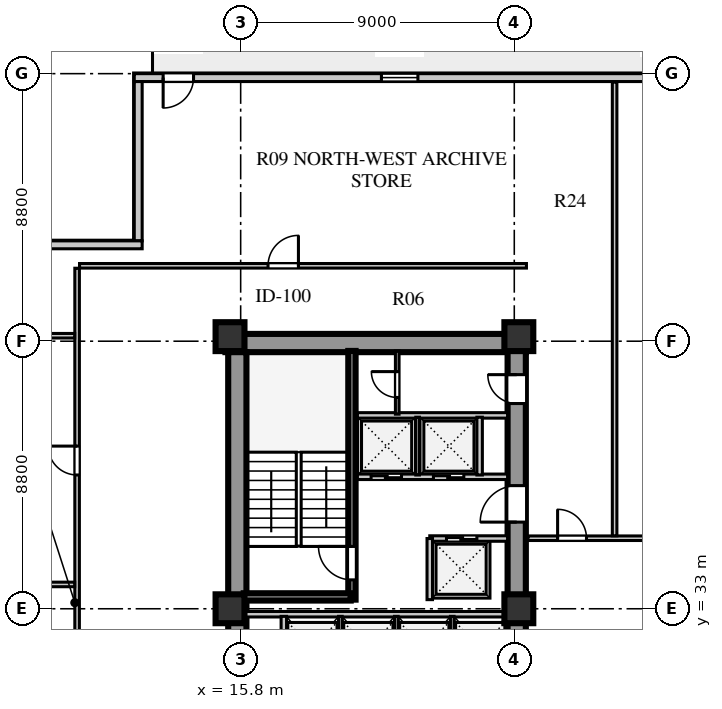
"""IFC4 building model, lengths in metres.
Left out: names, types, materials, properties, quantities, classifications, styles, units other than length and angle.
Written with IfcOpenShell. Run it as: python <this file> out.ifc"""

import sys

from ifc_helpers import new_model, si_unit, direction, frame, frame_2d, origin, origin_2d, place, context, subcontext, project, spatial, rectangle, extrude, element, fill, save


model = new_model("IFC4")
c1 = context("Model", 3, precision=1e-05, world=origin(), true_north=direction((0.0, 1.0)))
c2 = subcontext(c1, "Body", "Model", "MODEL_VIEW")
j1 = project(units=[si_unit("LENGTHUNIT", "METRE"), si_unit("PLANEANGLEUNIT", "RADIAN")], contexts=[c1])
p1 = place(None, origin())
s1 = spatial("IfcSite", under=j1, at=p1, CompositionType="ELEMENT")
p2 = place(p1, origin())
s2 = spatial("IfcBuilding", under=s1, at=p2, CompositionType="ELEMENT")
p3 = place(p2, frame((0.0, 0.0, 50.0)))
s3 = spatial("IfcBuildingStorey", under=s2, at=p3, CompositionType="ELEMENT", Elevation=50.0)
p4 = place(p3, frame((15.3, 41.74, 0.0), z_axis=(0.0, 0.0, 1.0), x_axis=(1.0, 0.0, 0.0)))
e1 = element("IfcWall", 1, at=p4, inside=s3, PredefinedType="SHEAR", context=c2, shape_type="SweptSolid", body=[
    extrude(rectangle(XDim=9.88, YDim=0.6, at=frame_2d((4.94, 0.0))), origin(), (0.0, 0.0, 1.0), 3.72),
])
p5 = place(p3, frame((15.69, 15.81, 0.0), z_axis=(0.0, 0.0, 1.0), x_axis=(0.0, 1.0, 0.0)))
e2 = element("IfcWall", 2, at=p5, inside=s3, PredefinedType="SHEAR", context=c2, shape_type="SweptSolid", body=[
    extrude(rectangle(XDim=25.63, YDim=0.6, at=frame_2d((12.815, 0.0))), origin(), (0.0, 0.0, 1.0), 3.72),
])
p6 = place(p3, frame((24.88, 15.74, 0.0), z_axis=(0.0, 0.0, 1.0), x_axis=(0.0, 1.0, 0.0)))
e3 = element("IfcWall", 3, at=p6, inside=s3, PredefinedType="SHEAR", context=c2, shape_type="SweptSolid", body=[
    extrude(rectangle(XDim=25.76, YDim=0.6, at=frame_2d((12.88, 0.0))), origin(), (0.0, 0.0, 1.0), 3.72),
])
p7 = place(p6, frame((1.61, 0.0, 0.0)))
e4 = element("IfcOpeningElement", 4, at=p7, cuts=e3, PredefinedType="OPENING", context=c2, shape_type="SweptSolid", body=[
    extrude(rectangle(XDim=1.2, YDim=2.1, at=frame_2d((0.6, 1.05))), frame((0.0, 0.31, 0.0), z_axis=(0.0, -1.0, 0.0), x_axis=(1.0, 0.0, 0.0)), (0.0, 0.0, 1.0), 0.62),
])
p8 = place(p6, frame((6.78, 0.0, 0.0)))
e5 = element("IfcOpeningElement", 5, at=p8, cuts=e3, PredefinedType="OPENING", context=c2, shape_type="SweptSolid", body=[
    extrude(rectangle(XDim=0.85, YDim=2.06, at=frame_2d((0.425, 1.03))), frame((0.0, 0.31, 0.0), z_axis=(0.0, -1.0, 0.0), x_axis=(1.0, 0.0, 0.0)), (0.0, 0.0, 1.0), 0.62),
])
p9 = place(p6, frame((12.11, 0.0, 0.0)))
e6 = element("IfcOpeningElement", 6, at=p9, cuts=e3, PredefinedType="OPENING", context=c2, shape_type="SweptSolid", body=[
    extrude(rectangle(XDim=1.5, YDim=2.12, at=frame_2d((0.75, 1.06))), frame((0.0, 0.31, 0.0), z_axis=(0.0, -1.0, 0.0), x_axis=(1.0, 0.0, 0.0)), (0.0, 0.0, 1.0), 0.62),
])
p10 = place(p6, frame((20.11, 0.0, 0.0)))
e7 = element("IfcOpeningElement", 7, at=p10, cuts=e3, PredefinedType="OPENING", context=c2, shape_type="SweptSolid", body=[
    extrude(rectangle(XDim=1.2, YDim=2.12, at=frame_2d((0.6, 1.06))), frame((0.0, 0.31, 0.0), z_axis=(0.0, -1.0, 0.0), x_axis=(1.0, 0.0, 0.0)), (0.0, 0.0, 1.0), 0.62),
])
p11 = place(p6, frame((24.01, 0.0, 0.0)))
e8 = element("IfcOpeningElement", 8, at=p11, cuts=e3, PredefinedType="OPENING", context=c2, shape_type="SweptSolid", body=[
    extrude(rectangle(XDim=0.95, YDim=2.1, at=frame_2d((0.475, 1.05))), frame((0.0, 0.31, 0.0), z_axis=(0.0, -1.0, 0.0), x_axis=(1.0, 0.0, 0.0)), (0.0, 0.0, 1.0), 0.62),
])
for number, where, z_axis, x_axis in (
    (9, (15.45, 33.0, 0.0), (0.0, 0.0, 1.0), (1.0, 0.0, 0.0)),
    (10, (15.45, 41.95, 0.0), (0.0, 0.0, 1.0), (1.0, 0.0, 0.0)),
    (11, (24.95, 33.0, 0.0), (0.0, 0.0, 1.0), (1.0, 0.0, 0.0)),
    (12, (24.95, 41.95, 0.0), (0.0, 0.0, 1.0), (1.0, 0.0, 0.0)),
):
    element("IfcColumn", number, at=place(p3, frame(where, z_axis=z_axis, x_axis=x_axis)), inside=s3, PredefinedType="COLUMN", context=c2, shape_type="SweptSolid", body=[
        extrude(rectangle(XDim=0.95, YDim=0.95, at=origin_2d()), origin(), (0.0, 0.0, 1.0), 3.72),
    ])
p12 = place(p3, frame((46.3, 50.47, 0.0), z_axis=(0.0, 0.0, 1.0), x_axis=(-1.0, 0.0, 0.0)))
e13 = element("IfcWall", 13, at=p12, inside=s3, PredefinedType="SOLIDWALL", context=c2, shape_type="SweptSolid", body=[
    extrude(rectangle(XDim=34.0, YDim=0.26, at=frame_2d((17.0, 0.0))), origin(), (0.0, 0.0, 1.0), 3.72),
])
p13 = place(p12, frame((32.05, 0.0, 0.0)))
e14 = element("IfcOpeningElement", 14, at=p13, cuts=e13, PredefinedType="OPENING", context=c2, shape_type="SweptSolid", body=[
    extrude(rectangle(XDim=1.0, YDim=2.05, at=frame_2d((0.5, 1.025))), frame((0.0, 0.14, 0.0), z_axis=(0.0, -1.0, 0.0), x_axis=(1.0, 0.0, 0.0)), (0.0, 0.0, 1.0), 0.28),
])
p14 = place(p12, frame((24.67, 0.0, 0.8)))
e15 = element("IfcOpeningElement", 15, at=p14, cuts=e13, PredefinedType="OPENING", context=c2, shape_type="SweptSolid", body=[
    extrude(rectangle(XDim=1.2, YDim=1.75, at=frame_2d((0.6, 0.875))), frame((0.0, 0.14, 0.0), z_axis=(0.0, -1.0, 0.0), x_axis=(1.0, 0.0, 0.0)), (0.0, 0.0, 1.0), 0.28),
])
p15 = place(p12, frame((15.95, 0.0, 0.8)))
e16 = element("IfcOpeningElement", 16, at=p15, cuts=e13, PredefinedType="OPENING", context=c2, shape_type="SweptSolid", body=[
    extrude(rectangle(XDim=1.2, YDim=1.75, at=frame_2d((0.6, 0.875))), frame((0.0, 0.14, 0.0), z_axis=(0.0, -1.0, 0.0), x_axis=(1.0, 0.0, 0.0)), (0.0, 0.0, 1.0), 0.28),
])
p16 = place(p12, frame((6.455, 0.0, 0.8)))
e17 = element("IfcOpeningElement", 17, at=p16, cuts=e13, PredefinedType="OPENING", context=c2, shape_type="SweptSolid", body=[
    extrude(rectangle(XDim=2.1, YDim=1.95, at=frame_2d((1.05, 0.975))), frame((0.0, 0.14, 0.0), z_axis=(0.0, -1.0, 0.0), x_axis=(1.0, 0.0, 0.0)), (0.0, 0.0, 1.0), 0.28),
])
p17 = place(p3, frame((12.43, 50.34, 0.0), z_axis=(0.0, 0.0, 1.0), x_axis=(0.0, -1.0, 0.0)))
e18 = element("IfcWall", 18, at=p17, inside=s3, PredefinedType="SOLIDWALL", context=c2, shape_type="SweptSolid", body=[
    extrude(rectangle(XDim=5.24, YDim=0.26, at=frame_2d((2.62, 0.0))), origin(), (0.0, 0.0, 1.0), 3.72),
])
p18 = place(p3, frame((12.56, 44.97, 0.0), z_axis=(0.0, 0.0, 1.0), x_axis=(-1.0, 0.0, 0.0)))
e19 = element("IfcWall", 19, at=p18, inside=s3, PredefinedType="SOLIDWALL", context=c2, shape_type="SweptSolid", body=[
    extrude(rectangle(XDim=5.76, YDim=0.26, at=frame_2d((2.88, 0.0))), origin(), (0.0, 0.0, 1.0), 3.72),
])
p19 = place(p3, frame((15.9, 32.82, 0.0), z_axis=(0.0, 0.0, 1.0), x_axis=(1.0, 0.0, 0.0)))
e20 = element("IfcWall", 20, at=p19, inside=s3, PredefinedType="SOLIDWALL", context=c2, shape_type="SweptSolid", body=[
    extrude(rectangle(XDim=8.68, YDim=0.18, at=frame_2d((4.34, 0.0))), origin(), (0.0, 0.0, 1.0), 3.02),
])
p20 = place(p3, frame((17.22, 30.7, 0.0), z_axis=(0.0, 0.0, 1.0), x_axis=(0.0, 1.0, 0.0)))
e21 = element("IfcWall", 21, at=p20, inside=s3, PredefinedType="SOLIDWALL", context=c2, shape_type="SweptSolid", body=[
    extrude(rectangle(XDim=2.05, YDim=0.18, at=frame_2d((1.025, 0.0))), origin(), (0.0, 0.0, 1.0), 3.72),
])
for number, where, z_axis, x_axis in (
    (22, (19.08, 30.7, 0.0), (0.0, 0.0, 1.0), (0.0, 1.0, 0.0)),
    (23, (20.92, 30.7, 0.0), (0.0, 0.0, 1.0), (0.0, 1.0, 0.0)),
    (24, (22.76, 30.7, 0.0), (0.0, 0.0, 1.0), (0.0, 1.0, 0.0)),
):
    element("IfcWall", number, at=place(p3, frame(where, z_axis=z_axis, x_axis=x_axis)), inside=s3, PredefinedType="PARTITIONING", context=c2, shape_type="SweptSolid", body=[
        extrude(rectangle(XDim=2.05, YDim=0.12, at=frame_2d((1.025, 0.0))), origin(), (0.0, 0.0, 1.0), 3.72),
    ])
p21 = place(p3, frame((19.46, 33.3, 0.0), z_axis=(0.0, 0.0, 1.0), x_axis=(0.0, 1.0, 0.0)))
e25 = element("IfcWall", 25, at=p21, inside=s3, PredefinedType="SHEAR", context=c2, shape_type="SweptSolid", body=[
    extrude(rectangle(XDim=8.18, YDim=0.24, at=frame_2d((4.09, 0.0))), origin(), (0.0, 0.0, 1.0), 4.0),
])
p22 = place(p21, frame((0.65, 0.0, 0.0)))
e26 = element("IfcOpeningElement", 26, at=p22, cuts=e25, PredefinedType="OPENING", context=c2, shape_type="SweptSolid", body=[
    extrude(rectangle(XDim=1.1, YDim=2.1, at=frame_2d((0.55, 1.05))), frame((0.0, 0.13, 0.0), z_axis=(0.0, -1.0, 0.0), x_axis=(1.0, 0.0, 0.0)), (0.0, 0.0, 1.0), 0.26),
])
p23 = place(p3, frame((15.9, 33.39, 0.0), z_axis=(0.0, 0.0, 1.0), x_axis=(1.0, 0.0, 0.0)))
e27 = element("IfcWall", 27, at=p23, inside=s3, PredefinedType="SHEAR", context=c2, shape_type="SweptSolid", body=[
    extrude(rectangle(XDim=3.52, YDim=0.24, at=frame_2d((1.76, 0.0))), origin(), (0.0, 0.0, 1.0), 4.0),
])
p24 = place(p3, frame((22.02, 35.31, 0.0), z_axis=(0.0, 0.0, 1.0), x_axis=(1.0, 0.0, 0.0)))
e28 = element("IfcWall", 28, at=p24, inside=s3, PredefinedType="SOLIDWALL", context=c2, shape_type="SweptSolid", body=[
    extrude(rectangle(XDim=2.56, YDim=0.18, at=frame_2d((1.28, 0.0))), origin(), (0.0, 0.0, 1.0), 3.72),
])
p25 = place(p24, frame((0.55, 0.0, 0.0)))
e29 = element("IfcOpeningElement", 29, at=p25, cuts=e28, PredefinedType="OPENING", context=c2, shape_type="SweptSolid", body=[
    extrude(rectangle(XDim=1.0, YDim=2.1, at=frame_2d((0.5, 1.05))), frame((0.0, 0.1, 0.0), z_axis=(0.0, -1.0, 0.0), x_axis=(1.0, 0.0, 0.0)), (0.0, 0.0, 1.0), 0.2),
])
p26 = place(p3, frame((22.02, 33.3, 0.0), z_axis=(0.0, 0.0, 1.0), x_axis=(0.0, 1.0, 0.0)))
e30 = element("IfcWall", 30, at=p26, inside=s3, PredefinedType="SOLIDWALL", context=c2, shape_type="SweptSolid", body=[
    extrude(rectangle(XDim=2.01, YDim=0.18, at=frame_2d((1.005, 0.0))), origin(), (0.0, 0.0, 1.0), 3.72),
])
p27 = place(p3, frame((19.64, 37.34, 0.0), z_axis=(0.0, 0.0, 1.0), x_axis=(1.0, 0.0, 0.0)))
e31 = element("IfcWall", 31, at=p27, inside=s3, PredefinedType="SOLIDWALL", context=c2, shape_type="SweptSolid", body=[
    extrude(rectangle(XDim=4.94, YDim=0.18, at=frame_2d((2.47, 0.0))), origin(), (0.0, 0.0, 1.0), 3.72),
])
p28 = place(p27, frame((0.45, 0.0, 0.0)))
e32 = element("IfcOpeningElement", 32, at=p28, cuts=e31, PredefinedType="OPENING", context=c2, shape_type="SweptSolid", body=[
    extrude(rectangle(XDim=1.0, YDim=2.1, at=frame_2d((0.5, 1.05))), frame((0.0, 0.1, 0.0), z_axis=(0.0, -1.0, 0.0), x_axis=(1.0, 0.0, 0.0)), (0.0, 0.0, 1.0), 0.2),
])
p29 = place(p27, frame((2.5, 0.0, 0.0)))
e33 = element("IfcOpeningElement", 33, at=p29, cuts=e31, PredefinedType="OPENING", context=c2, shape_type="SweptSolid", body=[
    extrude(rectangle(XDim=1.0, YDim=2.1, at=frame_2d((0.5, 1.05))), frame((0.0, 0.1, 0.0), z_axis=(0.0, -1.0, 0.0), x_axis=(1.0, 0.0, 0.0)), (0.0, 0.0, 1.0), 0.2),
])
p30 = place(p3, frame((19.64, 39.36, 0.0), z_axis=(0.0, 0.0, 1.0), x_axis=(1.0, 0.0, 0.0)))
e34 = element("IfcWall", 34, at=p30, inside=s3, PredefinedType="SOLIDWALL", context=c2, shape_type="SweptSolid", body=[
    extrude(rectangle(XDim=4.94, YDim=0.18, at=frame_2d((2.47, 0.0))), origin(), (0.0, 0.0, 1.0), 3.72),
])
p31 = place(p3, frame((21.62, 37.4, 0.0), z_axis=(0.0, 0.0, 1.0), x_axis=(0.0, 1.0, 0.0)))
e35 = element("IfcWall", 35, at=p31, inside=s3, PredefinedType="PARTITIONING", context=c2, shape_type="SweptSolid", body=[
    extrude(rectangle(XDim=1.9, YDim=0.12, at=frame_2d((0.95, 0.0))), origin(), (0.0, 0.0, 1.0), 3.72),
])
p32 = place(p3, frame((23.66, 37.4, 0.0), z_axis=(0.0, 0.0, 1.0), x_axis=(0.0, 1.0, 0.0)))
e36 = element("IfcWall", 36, at=p32, inside=s3, PredefinedType="SOLIDWALL", context=c2, shape_type="SweptSolid", body=[
    extrude(rectangle(XDim=1.9, YDim=0.18, at=frame_2d((0.95, 0.0))), origin(), (0.0, 0.0, 1.0), 3.72),
])
p33 = place(p3, frame((20.95, 39.4, 0.0), z_axis=(0.0, 0.0, 1.0), x_axis=(0.0, 1.0, 0.0)))
e37 = element("IfcWall", 37, at=p33, inside=s3, PredefinedType="PARTITIONING", context=c2, shape_type="SweptSolid", body=[
    extrude(rectangle(XDim=2.08, YDim=0.12, at=frame_2d((1.04, 0.0))), origin(), (0.0, 0.0, 1.0), 3.72),
])
p34 = place(p33, frame((0.55, 0.0, 0.0)))
e38 = element("IfcOpeningElement", 38, at=p34, cuts=e37, PredefinedType="OPENING", context=c2, shape_type="SweptSolid", body=[
    extrude(rectangle(XDim=0.85, YDim=2.06, at=frame_2d((0.425, 1.03))), frame((0.0, 0.07, 0.0), z_axis=(0.0, -1.0, 0.0), x_axis=(1.0, 0.0, 0.0)), (0.0, 0.0, 1.0), 0.14),
])
p35 = place(p3, frame((25.25, 35.32, 0.0), z_axis=(0.0, 0.0, 1.0), x_axis=(1.0, 0.0, 0.0)))
e39 = element("IfcWall", 39, at=p35, inside=s3, PredefinedType="PARTITIONING", context=c2, shape_type="SweptSolid", body=[
    extrude(rectangle(XDim=9.47, YDim=0.15, at=frame_2d((4.735, 0.0))), origin(), (0.0, 0.0, 1.0), 3.72),
])
p36 = place(p35, frame((0.975, 0.0, 0.0)))
e40 = element("IfcOpeningElement", 40, at=p36, cuts=e39, PredefinedType="OPENING", context=c2, shape_type="SweptSolid", body=[
    extrude(rectangle(XDim=0.95, YDim=2.08, at=frame_2d((0.475, 1.04))), frame((0.0, 0.085, 0.0), z_axis=(0.0, -1.0, 0.0), x_axis=(1.0, 0.0, 0.0)), (0.0, 0.0, 1.0), 0.17),
])
p37 = place(p35, frame((4.025, 0.0, 0.0)))
e41 = element("IfcOpeningElement", 41, at=p37, cuts=e39, PredefinedType="OPENING", context=c2, shape_type="SweptSolid", body=[
    extrude(rectangle(XDim=0.95, YDim=2.08, at=frame_2d((0.475, 1.04))), frame((0.0, 0.085, 0.0), z_axis=(0.0, -1.0, 0.0), x_axis=(1.0, 0.0, 0.0)), (0.0, 0.0, 1.0), 0.17),
])
p38 = place(p35, frame((7.315, 0.0, 0.0)))
e42 = element("IfcOpeningElement", 42, at=p38, cuts=e39, PredefinedType="OPENING", context=c2, shape_type="SweptSolid", body=[
    extrude(rectangle(XDim=0.95, YDim=2.08, at=frame_2d((0.475, 1.04))), frame((0.0, 0.085, 0.0), z_axis=(0.0, -1.0, 0.0), x_axis=(1.0, 0.0, 0.0)), (0.0, 0.0, 1.0), 0.17),
])
p39 = place(p3, frame((10.42, 13.0, 0.0), z_axis=(0.0, 0.0, 1.0), x_axis=(0.0, 1.0, 0.0)))
e43 = element("IfcWall", 43, at=p39, inside=s3, PredefinedType="PARTITIONING", context=c2, shape_type="SweptSolid", body=[
    extrude(rectangle(XDim=31.2, YDim=0.15, at=frame_2d((15.6, 0.0))), origin(), (0.0, 0.0, 1.0), 3.72),
])
p40 = place(p39, frame((5.8, 0.0, 0.0)))
e44 = element("IfcOpeningElement", 44, at=p40, cuts=e43, PredefinedType="OPENING", context=c2, shape_type="SweptSolid", body=[
    extrude(rectangle(XDim=0.95, YDim=2.08, at=frame_2d((0.475, 1.04))), frame((0.0, 0.085, 0.0), z_axis=(0.0, -1.0, 0.0), x_axis=(1.0, 0.0, 0.0)), (0.0, 0.0, 1.0), 0.17),
])
p41 = place(p39, frame((15.05, 0.0, 0.0)))
e45 = element("IfcOpeningElement", 45, at=p41, cuts=e43, PredefinedType="OPENING", context=c2, shape_type="SweptSolid", body=[
    extrude(rectangle(XDim=0.95, YDim=2.08, at=frame_2d((0.475, 1.04))), frame((0.0, 0.085, 0.0), z_axis=(0.0, -1.0, 0.0), x_axis=(1.0, 0.0, 0.0)), (0.0, 0.0, 1.0), 0.17),
])
p42 = place(p39, frame((24.4, 0.0, 0.0)))
e46 = element("IfcOpeningElement", 46, at=p42, cuts=e43, PredefinedType="OPENING", context=c2, shape_type="SweptSolid", body=[
    extrude(rectangle(XDim=0.95, YDim=2.08, at=frame_2d((0.475, 1.04))), frame((0.0, 0.085, 0.0), z_axis=(0.0, -1.0, 0.0), x_axis=(1.0, 0.0, 0.0)), (0.0, 0.0, 1.0), 0.17),
])
p43 = place(p3, frame((7.08, 41.98, 0.0), z_axis=(0.0, 0.0, 1.0), x_axis=(1.0, 0.0, 0.0)))
e47 = element("IfcWall", 47, at=p43, inside=s3, PredefinedType="PARTITIONING", context=c2, shape_type="SweptSolid", body=[
    extrude(rectangle(XDim=3.26, YDim=0.15, at=frame_2d((1.63, 0.0))), origin(), (0.0, 0.0, 1.0), 3.22),
])
p44 = place(p3, frame((10.5, 44.28, 0.0), z_axis=(0.0, 0.0, 1.0), x_axis=(1.0, 0.0, 0.0)))
e48 = element("IfcWall", 48, at=p44, inside=s3, PredefinedType="PARTITIONING", context=c2, shape_type="SweptSolid", body=[
    extrude(rectangle(XDim=14.7, YDim=0.15, at=frame_2d((7.35, 0.0))), origin(), (0.0, 0.0, 1.0), 3.72),
])
p45 = place(p44, frame((6.2, 0.0, 0.0)))
e49 = element("IfcOpeningElement", 49, at=p45, cuts=e48, PredefinedType="OPENING", context=c2, shape_type="SweptSolid", body=[
    extrude(rectangle(XDim=1.0, YDim=2.08, at=frame_2d((0.5, 1.04))), frame((0.0, 0.085, 0.0), z_axis=(0.0, -1.0, 0.0), x_axis=(1.0, 0.0, 0.0)), (0.0, 0.0, 1.0), 0.17),
])
p46 = place(p3, frame((7.08, 33.8, 0.0), z_axis=(0.0, 0.0, 1.0), x_axis=(1.0, 0.0, 0.0)))
e50 = element("IfcWall", 50, at=p46, inside=s3, PredefinedType="PARTITIONING", context=c2, shape_type="SweptSolid", body=[
    extrude(rectangle(XDim=3.26, YDim=0.15, at=frame_2d((1.63, 0.0))), origin(), (0.0, 0.0, 1.0), 3.72),
])
p47 = place(p3, frame((28.1, 35.4, 0.0), z_axis=(0.0, 0.0, 1.0), x_axis=(0.0, 1.0, 0.0)))
e51 = element("IfcWall", 51, at=p47, inside=s3, PredefinedType="PARTITIONING", context=c2, shape_type="SweptSolid", body=[
    extrude(rectangle(XDim=14.92, YDim=0.15, at=frame_2d((7.46, 0.0))), origin(), (0.0, 0.0, 1.0), 3.72),
])
p48 = place(p13, frame((1.0, 0.0, 0.0), z_axis=(0.0, 0.0, 1.0), x_axis=(-1.0, 0.0, 0.0)))
e52 = element("IfcDoor", 52, at=p48, inside=s3, OperationType="SINGLE_SWING_LEFT", PredefinedType="DOOR", context=c2, shape_type="SweptSolid", body=[
    extrude(rectangle(XDim=1.0, YDim=2.05, at=frame_2d((0.5, 1.025))), frame((0.0, 0.025, 0.0), z_axis=(0.0, -1.0, 0.0), x_axis=(1.0, 0.0, 0.0)), (0.0, 0.0, 1.0), 0.05),
])
fill(e14, e52)
p49 = place(p14, origin())
e53 = element("IfcWindow", 53, at=p49, inside=s3, PartitioningType="SINGLE_PANEL", PredefinedType="WINDOW", context=c2, shape_type="SweptSolid", body=[
    extrude(rectangle(XDim=1.2, YDim=1.75, at=frame_2d((0.6, 0.875))), frame((0.0, 0.03, 0.0), z_axis=(0.0, -1.0, 0.0), x_axis=(1.0, 0.0, 0.0)), (0.0, 0.0, 1.0), 0.06),
])
fill(e15, e53)
p50 = place(p22, origin())
e54 = element("IfcDoor", 54, at=p50, inside=s3, OperationType="SINGLE_SWING_RIGHT", PredefinedType="DOOR", context=c2, shape_type="SweptSolid", body=[
    extrude(rectangle(XDim=1.1, YDim=2.1, at=frame_2d((0.55, 1.05))), frame((0.0, 0.025, 0.0), z_axis=(0.0, -1.0, 0.0), x_axis=(1.0, 0.0, 0.0)), (0.0, 0.0, 1.0), 0.05),
])
fill(e26, e54)
p51 = place(p10, frame((1.2, 0.0, 0.0), z_axis=(0.0, 0.0, 1.0), x_axis=(-1.0, 0.0, 0.0)))
e55 = element("IfcDoor", 55, at=p51, inside=s3, OperationType="SINGLE_SWING_RIGHT", PredefinedType="DOOR", context=c2, shape_type="SweptSolid", body=[
    extrude(rectangle(XDim=1.2, YDim=2.12, at=frame_2d((0.6, 1.06))), frame((0.0, 0.025, 0.0), z_axis=(0.0, -1.0, 0.0), x_axis=(1.0, 0.0, 0.0)), (0.0, 0.0, 1.0), 0.05),
])
fill(e7, e55)
p52 = place(p28, frame((1.0, 0.0, 0.0), z_axis=(0.0, 0.0, 1.0), x_axis=(-1.0, 0.0, 0.0)))
e56 = element("IfcDoor", 56, at=p52, inside=s3, OperationType="DOUBLE_DOOR_SLIDING", PredefinedType="DOOR", context=c2, shape_type="SweptSolid", body=[
    extrude(rectangle(XDim=1.0, YDim=2.1, at=frame_2d((0.5, 1.05))), frame((0.0, 0.025, 0.0), z_axis=(0.0, -1.0, 0.0), x_axis=(1.0, 0.0, 0.0)), (0.0, 0.0, 1.0), 0.05),
])
fill(e32, e56)
p53 = place(p29, frame((1.0, 0.0, 0.0), z_axis=(0.0, 0.0, 1.0), x_axis=(-1.0, 0.0, 0.0)))
e57 = element("IfcDoor", 57, at=p53, inside=s3, OperationType="DOUBLE_DOOR_SLIDING", PredefinedType="DOOR", context=c2, shape_type="SweptSolid", body=[
    extrude(rectangle(XDim=1.0, YDim=2.1, at=frame_2d((0.5, 1.05))), frame((0.0, 0.025, 0.0), z_axis=(0.0, -1.0, 0.0), x_axis=(1.0, 0.0, 0.0)), (0.0, 0.0, 1.0), 0.05),
])
fill(e33, e57)
p54 = place(p25, origin())
e58 = element("IfcDoor", 58, at=p54, inside=s3, OperationType="DOUBLE_DOOR_SLIDING", PredefinedType="DOOR", context=c2, shape_type="SweptSolid", body=[
    extrude(rectangle(XDim=1.0, YDim=2.1, at=frame_2d((0.5, 1.05))), frame((0.0, 0.025, 0.0), z_axis=(0.0, -1.0, 0.0), x_axis=(1.0, 0.0, 0.0)), (0.0, 0.0, 1.0), 0.05),
])
fill(e29, e58)
p55 = place(p34, origin())
e59 = element("IfcDoor", 59, at=p55, inside=s3, OperationType="SINGLE_SWING_RIGHT", PredefinedType="DOOR", context=c2, shape_type="SweptSolid", body=[
    extrude(rectangle(XDim=0.85, YDim=2.06, at=frame_2d((0.425, 1.03))), frame((0.0, 0.025, 0.0), z_axis=(0.0, -1.0, 0.0), x_axis=(1.0, 0.0, 0.0)), (0.0, 0.0, 1.0), 0.05),
])
fill(e38, e59)
p56 = place(p11, frame((0.95, 0.0, 0.0), z_axis=(0.0, 0.0, 1.0), x_axis=(-1.0, 0.0, 0.0)))
e60 = element("IfcDoor", 60, at=p56, inside=s3, OperationType="SINGLE_SWING_LEFT", PredefinedType="DOOR", context=c2, shape_type="SweptSolid", body=[
    extrude(rectangle(XDim=0.95, YDim=2.1, at=frame_2d((0.475, 1.05))), frame((0.0, 0.025, 0.0), z_axis=(0.0, -1.0, 0.0), x_axis=(1.0, 0.0, 0.0)), (0.0, 0.0, 1.0), 0.05),
])
fill(e8, e60)
p57 = place(p45, origin())
e61 = element("IfcDoor", 61, at=p57, inside=s3, OperationType="SINGLE_SWING_RIGHT", PredefinedType="DOOR", context=c2, shape_type="SweptSolid", body=[
    extrude(rectangle(XDim=1.0, YDim=2.08, at=frame_2d((0.5, 1.04))), frame((0.0, 0.025, 0.0), z_axis=(0.0, -1.0, 0.0), x_axis=(1.0, 0.0, 0.0)), (0.0, 0.0, 1.0), 0.05),
])
fill(e49, e61)
p58 = place(p42, frame((0.95, 0.0, 0.0), z_axis=(0.0, 0.0, 1.0), x_axis=(-1.0, 0.0, 0.0)))
e62 = element("IfcDoor", 62, at=p58, inside=s3, OperationType="SINGLE_SWING_LEFT", PredefinedType="DOOR", context=c2, shape_type="SweptSolid", body=[
    extrude(rectangle(XDim=0.95, YDim=2.08, at=frame_2d((0.475, 1.04))), frame((0.0, 0.025, 0.0), z_axis=(0.0, -1.0, 0.0), x_axis=(1.0, 0.0, 0.0)), (0.0, 0.0, 1.0), 0.05),
])
fill(e46, e62)
p59 = place(p36, origin())
e63 = element("IfcDoor", 63, at=p59, inside=s3, OperationType="SINGLE_SWING_LEFT", PredefinedType="DOOR", context=c2, shape_type="SweptSolid", body=[
    extrude(rectangle(XDim=0.95, YDim=2.08, at=frame_2d((0.475, 1.04))), frame((0.0, 0.025, 0.0), z_axis=(0.0, -1.0, 0.0), x_axis=(1.0, 0.0, 0.0)), (0.0, 0.0, 1.0), 0.05),
])
fill(e40, e63)
save(model, sys.argv[1])
